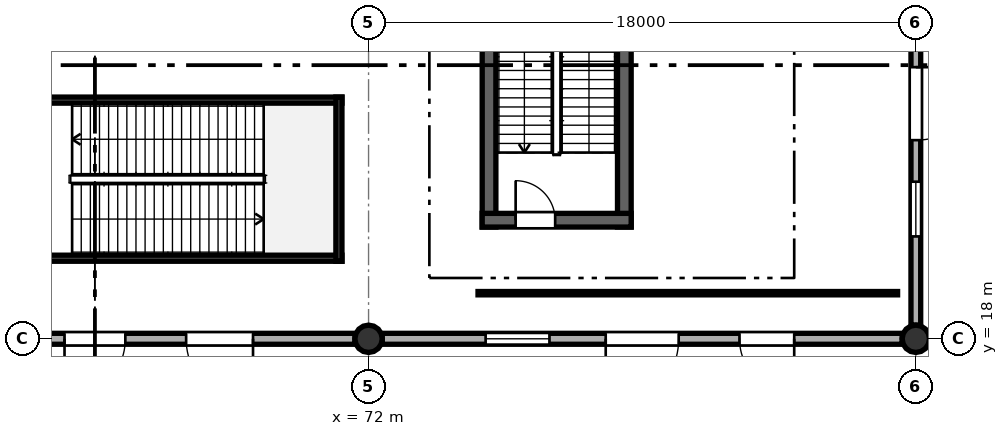
"""IFC4 building model, lengths in metres.
Left out: names, types, materials, properties, quantities, classifications, styles, units other than length and angle.
Written with IfcOpenShell. Run it as: python <this file> out.ifc"""

import sys

from ifc_helpers import new_model, si_unit, direction, frame, frame_2d, origin, origin_2d, place, context, subcontext, project, spatial, rectangle, circle, extrude, element, fill, save


model = new_model("IFC4")
c1 = context("Model", 3, precision=1e-05, world=origin(), true_north=direction((0.0, 1.0)))
c2 = subcontext(c1, "Body", "Model", "MODEL_VIEW")
j1 = project(units=[si_unit("LENGTHUNIT", "METRE"), si_unit("PLANEANGLEUNIT", "RADIAN")], contexts=[c1])
p1 = place(None, origin())
s1 = spatial("IfcSite", under=j1, at=p1, CompositionType="ELEMENT")
p2 = place(p1, origin())
s2 = spatial("IfcBuilding", under=s1, at=p2, CompositionType="ELEMENT")
p3 = place(p2, origin())
s3 = spatial("IfcBuildingStorey", under=s2, at=p3, CompositionType="ELEMENT", Elevation=0.0)
for number, where, z_axis, x_axis in (
    (1, (72.0, 18.0, 0.0), (0.0, 0.0, 1.0), (1.0, 0.0, 0.0)),
    (2, (90.0, 18.0, 0.0), (0.0, 0.0, 1.0), (1.0, 0.0, 0.0)),
):
    element("IfcColumn", number, at=place(p3, frame(where, z_axis=z_axis, x_axis=x_axis)), inside=s3, PredefinedType="COLUMN", context=c2, shape_type="SweptSolid", body=[
        extrude(circle(Radius=0.45, at=origin_2d()), origin(), (0.0, 0.0, 1.0), 6.6),
    ])
p4 = place(p3, frame((71.55, 18.0, 0.0), z_axis=(0.0, 0.0, 1.0), x_axis=(-1.0, 0.0, 0.0)))
e3 = element("IfcWall", 3, at=p4, inside=s3, PredefinedType="SOLIDWALL", context=c2, shape_type="SweptSolid", body=[
    extrude(rectangle(XDim=17.1, YDim=0.36, at=frame_2d((8.55, 0.0))), origin(), (0.0, 0.0, 1.0), 5.595),
])
p5 = place(p4, frame((3.35, 0.0, 0.0)))
e4 = element("IfcOpeningElement", 4, at=p5, cuts=e3, PredefinedType="OPENING", context=c2, shape_type="SweptSolid", body=[
    extrude(rectangle(XDim=2.2, YDim=2.45, at=frame_2d((1.1, 1.225))), frame((0.0, 0.19, 0.0), z_axis=(0.0, -1.0, 0.0), x_axis=(1.0, 0.0, 0.0)), (0.0, 0.0, 1.0), 0.38),
])
p6 = place(p4, frame((7.55, 0.0, 0.0)))
e5 = element("IfcOpeningElement", 5, at=p6, cuts=e3, PredefinedType="OPENING", context=c2, shape_type="SweptSolid", body=[
    extrude(rectangle(XDim=2.0, YDim=2.4, at=frame_2d((1.0, 1.2))), frame((0.0, 0.19, 0.0), z_axis=(0.0, -1.0, 0.0), x_axis=(1.0, 0.0, 0.0)), (0.0, 0.0, 1.0), 0.38),
])
p7 = place(p4, frame((11.45, 0.0, 0.95)))
e6 = element("IfcOpeningElement", 6, at=p7, cuts=e3, PredefinedType="OPENING", context=c2, shape_type="SweptSolid", body=[
    extrude(rectangle(XDim=2.4, YDim=2.1, at=frame_2d((1.2, 1.05))), frame((0.0, 0.19, 0.0), z_axis=(0.0, -1.0, 0.0), x_axis=(1.0, 0.0, 0.0)), (0.0, 0.0, 1.0), 0.38),
])
p8 = place(p3, frame((89.55, 18.0, 0.0), z_axis=(0.0, 0.0, 1.0), x_axis=(-1.0, 0.0, 0.0)))
e7 = element("IfcWall", 7, at=p8, inside=s3, PredefinedType="SOLIDWALL", context=c2, shape_type="SweptSolid", body=[
    extrude(rectangle(XDim=17.1, YDim=0.36, at=frame_2d((8.55, 0.0))), origin(), (0.0, 0.0, 1.0), 5.595),
])
p9 = place(p8, frame((3.55, 0.0, 0.0)))
e8 = element("IfcOpeningElement", 8, at=p9, cuts=e7, PredefinedType="OPENING", context=c2, shape_type="SweptSolid", body=[
    extrude(rectangle(XDim=1.8, YDim=2.35, at=frame_2d((0.9, 1.175))), frame((0.0, 0.19, 0.0), z_axis=(0.0, -1.0, 0.0), x_axis=(1.0, 0.0, 0.0)), (0.0, 0.0, 1.0), 0.38),
])
p10 = place(p8, frame((7.35, 0.0, 0.0)))
e9 = element("IfcOpeningElement", 9, at=p10, cuts=e7, PredefinedType="OPENING", context=c2, shape_type="SweptSolid", body=[
    extrude(rectangle(XDim=2.4, YDim=2.5, at=frame_2d((1.2, 1.25))), frame((0.0, 0.19, 0.0), z_axis=(0.0, -1.0, 0.0), x_axis=(1.0, 0.0, 0.0)), (0.0, 0.0, 1.0), 0.38),
])
p11 = place(p8, frame((11.6, 0.0, 0.95)))
e10 = element("IfcOpeningElement", 10, at=p11, cuts=e7, PredefinedType="OPENING", context=c2, shape_type="SweptSolid", body=[
    extrude(rectangle(XDim=2.1, YDim=2.0, at=frame_2d((1.05, 1.0))), frame((0.0, 0.19, 0.0), z_axis=(0.0, -1.0, 0.0), x_axis=(1.0, 0.0, 0.0)), (0.0, 0.0, 1.0), 0.38),
])
p12 = place(p3, frame((90.0, 29.55, 0.0), z_axis=(0.0, 0.0, 1.0), x_axis=(0.0, -1.0, 0.0)))
e11 = element("IfcWall", 11, at=p12, inside=s3, PredefinedType="SOLIDWALL", context=c2, shape_type="SweptSolid", body=[
    extrude(rectangle(XDim=11.1, YDim=0.32, at=frame_2d((5.55, 0.0))), origin(), (0.0, 0.0, 1.0), 5.595),
])
p13 = place(p12, frame((2.617, 0.0, 0.0)))
e12 = element("IfcOpeningElement", 12, at=p13, cuts=e11, PredefinedType="OPENING", context=c2, shape_type="SweptSolid", body=[
    extrude(rectangle(XDim=2.4, YDim=2.5, at=frame_2d((1.2, 1.25))), frame((0.0, 0.17, 0.0), z_axis=(0.0, -1.0, 0.0), x_axis=(1.0, 0.0, 0.0)), (0.0, 0.0, 1.0), 0.34),
])
p14 = place(p12, frame((6.383, 0.0, 0.95)))
e13 = element("IfcOpeningElement", 13, at=p14, cuts=e11, PredefinedType="OPENING", context=c2, shape_type="SweptSolid", body=[
    extrude(rectangle(XDim=1.8, YDim=2.0, at=frame_2d((0.9, 1.0))), frame((0.0, 0.17, 0.0), z_axis=(0.0, -1.0, 0.0), x_axis=(1.0, 0.0, 0.0)), (0.0, 0.0, 1.0), 0.34),
])
for number, where, z_axis, x_axis in (
    (14, (80.413, 21.675, 0.0), (0.0, 0.0, 1.0), (0.0, 1.0, 0.0)),
    (15, (75.962, 32.75, 0.0), (0.0, 0.0, 1.0), (0.0, -1.0, 0.0)),
):
    element("IfcWall", number, at=place(p3, frame(where, z_axis=z_axis, x_axis=x_axis)), inside=s3, PredefinedType="SHEAR", context=c2, shape_type="SweptSolid", body=[
        extrude(rectangle(XDim=11.075, YDim=0.45, at=frame_2d((5.538, 0.0))), origin(), (0.0, 0.0, 1.0), 6.32),
    ])
p15 = place(p3, frame((75.738, 21.9, 0.0), z_axis=(0.0, 0.0, 1.0), x_axis=(1.0, 0.0, 0.0)))
e16 = element("IfcWall", 16, at=p15, inside=s3, PredefinedType="SHEAR", context=c2, shape_type="SweptSolid", body=[
    extrude(rectangle(XDim=4.9, YDim=0.45, at=frame_2d((2.45, 0.0))), origin(), (0.0, 0.0, 1.0), 6.32),
])
p16 = place(p15, frame((1.1, 0.0, 0.0)))
e17 = element("IfcOpeningElement", 17, at=p16, cuts=e16, PredefinedType="OPENING", context=c2, shape_type="SweptSolid", body=[
    extrude(rectangle(XDim=1.3, YDim=2.1, at=frame_2d((0.65, 1.05))), frame((0.0, 0.235, 0.0), z_axis=(0.0, -1.0, 0.0), x_axis=(1.0, 0.0, 0.0)), (0.0, 0.0, 1.0), 0.47),
])
for number, where, z_axis, x_axis in (
    (18, (59.55, 20.65, 0.0), (0.0, 0.0, 1.0), (1.0, 0.0, 0.0)),
    (19, (71.125, 25.85, 0.0), (0.0, 0.0, 1.0), (-1.0, 0.0, 0.0)),
):
    element("IfcWall", number, at=place(p3, frame(where, z_axis=z_axis, x_axis=x_axis)), inside=s3, PredefinedType="SOLIDWALL", context=c2, shape_type="SweptSolid", body=[
        extrude(rectangle(XDim=11.575, YDim=0.2, at=frame_2d((5.788, 0.0))), origin(), (0.0, 0.0, 1.0), 6.32),
    ])
p17 = place(p3, frame((71.025, 20.55, 0.0), z_axis=(0.0, 0.0, 1.0), x_axis=(0.0, 1.0, 0.0)))
e20 = element("IfcWall", 20, at=p17, inside=s3, PredefinedType="SOLIDWALL", context=c2, shape_type="SweptSolid", body=[
    extrude(rectangle(XDim=5.4, YDim=0.2, at=frame_2d((2.7, 0.0))), origin(), (0.0, 0.0, 1.0), 6.32),
])
p18 = place(p3, frame((75.6, 19.5, 0.0), z_axis=(0.0, 0.0, 1.0), x_axis=(1.0, 0.0, 0.0)))
e21 = element("IfcWall", 21, at=p18, inside=s3, PredefinedType="PARTITIONING", context=c2, shape_type="SweptSolid", body=[
    extrude(rectangle(XDim=13.8, YDim=0.11, at=frame_2d((6.9, 0.0))), origin(), (0.0, 0.0, 1.0), 4.4),
])
p19 = place(p5, origin())
e22 = element("IfcDoor", 22, at=p19, inside=s3, OperationType="SINGLE_SWING_LEFT", PredefinedType="DOOR", context=c2, shape_type="SweptSolid", body=[
    extrude(rectangle(XDim=2.2, YDim=2.45, at=frame_2d((1.1, 1.225))), frame((0.0, 0.025, 0.0), z_axis=(0.0, -1.0, 0.0), x_axis=(1.0, 0.0, 0.0)), (0.0, 0.0, 1.0), 0.05),
])
fill(e4, e22)
p20 = place(p6, origin())
e23 = element("IfcDoor", 23, at=p20, inside=s3, OperationType="SINGLE_SWING_RIGHT", PredefinedType="DOOR", context=c2, shape_type="SweptSolid", body=[
    extrude(rectangle(XDim=2.0, YDim=2.4, at=frame_2d((1.0, 1.2))), frame((0.0, 0.025, 0.0), z_axis=(0.0, -1.0, 0.0), x_axis=(1.0, 0.0, 0.0)), (0.0, 0.0, 1.0), 0.05),
])
fill(e5, e23)
p21 = place(p9, origin())
e24 = element("IfcDoor", 24, at=p21, inside=s3, OperationType="SINGLE_SWING_LEFT", PredefinedType="DOOR", context=c2, shape_type="SweptSolid", body=[
    extrude(rectangle(XDim=1.8, YDim=2.35, at=frame_2d((0.9, 1.175))), frame((0.0, 0.025, 0.0), z_axis=(0.0, -1.0, 0.0), x_axis=(1.0, 0.0, 0.0)), (0.0, 0.0, 1.0), 0.05),
])
fill(e8, e24)
p22 = place(p10, origin())
e25 = element("IfcDoor", 25, at=p22, inside=s3, OperationType="SINGLE_SWING_RIGHT", PredefinedType="DOOR", context=c2, shape_type="SweptSolid", body=[
    extrude(rectangle(XDim=2.4, YDim=2.5, at=frame_2d((1.2, 1.25))), frame((0.0, 0.025, 0.0), z_axis=(0.0, -1.0, 0.0), x_axis=(1.0, 0.0, 0.0)), (0.0, 0.0, 1.0), 0.05),
])
fill(e9, e25)
p23 = place(p11, origin())
e26 = element("IfcWindow", 26, at=p23, inside=s3, PartitioningType="SINGLE_PANEL", PredefinedType="WINDOW", context=c2, shape_type="SweptSolid", body=[
    extrude(rectangle(XDim=2.1, YDim=2.0, at=frame_2d((1.05, 1.0))), frame((0.0, 0.03, 0.0), z_axis=(0.0, -1.0, 0.0), x_axis=(1.0, 0.0, 0.0)), (0.0, 0.0, 1.0), 0.06),
])
fill(e10, e26)
p24 = place(p13, origin())
e27 = element("IfcDoor", 27, at=p24, inside=s3, OperationType="SINGLE_SWING_LEFT", PredefinedType="DOOR", context=c2, shape_type="SweptSolid", body=[
    extrude(rectangle(XDim=2.4, YDim=2.5, at=frame_2d((1.2, 1.25))), frame((0.0, 0.025, 0.0), z_axis=(0.0, -1.0, 0.0), x_axis=(1.0, 0.0, 0.0)), (0.0, 0.0, 1.0), 0.05),
])
fill(e12, e27)
p25 = place(p14, origin())
e28 = element("IfcWindow", 28, at=p25, inside=s3, PartitioningType="SINGLE_PANEL", PredefinedType="WINDOW", context=c2, shape_type="SweptSolid", body=[
    extrude(rectangle(XDim=1.8, YDim=2.0, at=frame_2d((0.9, 1.0))), frame((0.0, 0.03, 0.0), z_axis=(0.0, -1.0, 0.0), x_axis=(1.0, 0.0, 0.0)), (0.0, 0.0, 1.0), 0.06),
])
fill(e13, e28)
p26 = place(p16, origin())
e29 = element("IfcDoor", 29, at=p26, inside=s3, OperationType="SINGLE_SWING_LEFT", PredefinedType="DOOR", context=c2, shape_type="SweptSolid", body=[
    extrude(rectangle(XDim=1.3, YDim=2.1, at=frame_2d((0.65, 1.05))), frame((0.0, 0.025, 0.0), z_axis=(0.0, -1.0, 0.0), x_axis=(1.0, 0.0, 0.0)), (0.0, 0.0, 1.0), 0.05),
])
fill(e17, e29)
save(model, sys.argv[1])
